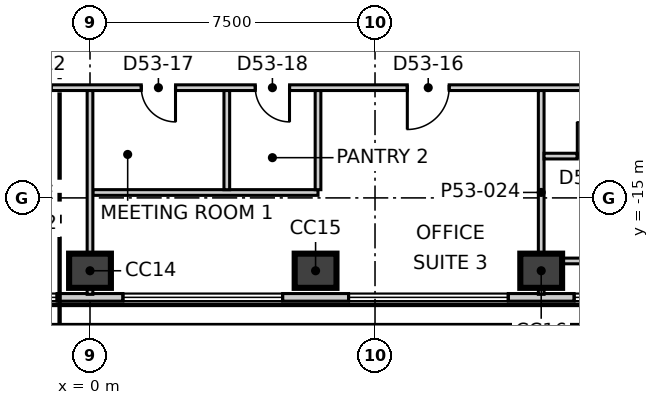
"""IFC4 building model, lengths in metres.
Left out: names, types, materials, properties, quantities, classifications, styles, units other than length and angle.
Written with IfcOpenShell. Run it as: python <this file> out.ifc"""

import sys

from ifc_helpers import new_model, si_unit, direction, frame, frame_2d, origin, origin_2d, place, context, subcontext, project, spatial, rectangle, extrude, element, fill, save


model = new_model("IFC4")
c1 = context("Model", 3, precision=1e-05, world=origin(), true_north=direction((0.0, 1.0)))
c2 = subcontext(c1, "Body", "Model", "MODEL_VIEW")
j1 = project(units=[si_unit("LENGTHUNIT", "METRE"), si_unit("PLANEANGLEUNIT", "RADIAN")], contexts=[c1])
p1 = place(None, origin())
s1 = spatial("IfcSite", under=j1, at=p1, CompositionType="ELEMENT")
p2 = place(p1, origin())
s2 = spatial("IfcBuilding", under=s1, at=p2, CompositionType="ELEMENT")
p3 = place(p2, frame((0.0, 0.0, 227.3)))
s3 = spatial("IfcBuildingStorey", under=s2, at=p3, CompositionType="ELEMENT", Elevation=227.3)
for number, where, z_axis, x_axis in (
    (1, (0.0, -16.917, -0.3), (0.0, 0.0, 1.0), (1.0, 0.0, 0.0)),
    (2, (5.936, -16.917, -0.3), (0.0, 0.0, 1.0), (1.0, 0.0, 0.0)),
    (3, (11.873, -16.917, -0.3), (0.0, 0.0, 1.0), (1.0, 0.0, 0.0)),
):
    element("IfcColumn", number, at=place(p3, frame(where, z_axis=z_axis, x_axis=x_axis)), inside=s3, PredefinedType="COLUMN", context=c2, shape_type="SweptSolid", body=[
        extrude(rectangle(XDim=1.1, YDim=0.9, at=origin_2d()), origin(), (0.0, 0.0, 1.0), 4.0),
    ])
p4 = place(p3, frame((-25.049, -17.617, 0.0), z_axis=(0.0, 0.0, 1.0), x_axis=(1.0, 0.0, 0.0)))
e4 = element("IfcWall", 4, at=p4, inside=s3, PredefinedType="ELEMENTEDWALL", context=c2, shape_type="SweptSolid", body=[
    extrude(rectangle(XDim=50.078, YDim=0.2, at=frame_2d((25.039, 0.0))), origin(), (0.0, 0.0, 1.0), 3.7),
])
p5 = place(p4, frame((2.171, 0.0, 0.9)))
e5 = element("IfcOpeningElement", 5, at=p5, cuts=e4, PredefinedType="OPENING", context=c2, shape_type="SweptSolid", body=[
    extrude(rectangle(XDim=4.2, YDim=2.5, at=frame_2d((2.1, 1.25))), frame((0.0, 0.11, 0.0), z_axis=(0.0, -1.0, 0.0), x_axis=(1.0, 0.0, 0.0)), (0.0, 0.0, 1.0), 0.22),
])
p6 = place(p4, frame((8.108, 0.0, 0.9)))
e6 = element("IfcOpeningElement", 6, at=p6, cuts=e4, PredefinedType="OPENING", context=c2, shape_type="SweptSolid", body=[
    extrude(rectangle(XDim=4.2, YDim=2.5, at=frame_2d((2.1, 1.25))), frame((0.0, 0.11, 0.0), z_axis=(0.0, -1.0, 0.0), x_axis=(1.0, 0.0, 0.0)), (0.0, 0.0, 1.0), 0.22),
])
p7 = place(p4, frame((14.044, 0.0, 0.9)))
e7 = element("IfcOpeningElement", 7, at=p7, cuts=e4, PredefinedType="OPENING", context=c2, shape_type="SweptSolid", body=[
    extrude(rectangle(XDim=4.2, YDim=2.5, at=frame_2d((2.1, 1.25))), frame((0.0, 0.11, 0.0), z_axis=(0.0, -1.0, 0.0), x_axis=(1.0, 0.0, 0.0)), (0.0, 0.0, 1.0), 0.22),
])
p8 = place(p4, frame((19.981, 0.0, 0.9)))
e8 = element("IfcOpeningElement", 8, at=p8, cuts=e4, PredefinedType="OPENING", context=c2, shape_type="SweptSolid", body=[
    extrude(rectangle(XDim=4.2, YDim=2.5, at=frame_2d((2.1, 1.25))), frame((0.0, 0.11, 0.0), z_axis=(0.0, -1.0, 0.0), x_axis=(1.0, 0.0, 0.0)), (0.0, 0.0, 1.0), 0.22),
])
p9 = place(p4, frame((25.917, 0.0, 0.9)))
e9 = element("IfcOpeningElement", 9, at=p9, cuts=e4, PredefinedType="OPENING", context=c2, shape_type="SweptSolid", body=[
    extrude(rectangle(XDim=4.2, YDim=2.5, at=frame_2d((2.1, 1.25))), frame((0.0, 0.11, 0.0), z_axis=(0.0, -1.0, 0.0), x_axis=(1.0, 0.0, 0.0)), (0.0, 0.0, 1.0), 0.22),
])
p10 = place(p4, frame((31.854, 0.0, 0.9)))
e10 = element("IfcOpeningElement", 10, at=p10, cuts=e4, PredefinedType="OPENING", context=c2, shape_type="SweptSolid", body=[
    extrude(rectangle(XDim=4.2, YDim=2.5, at=frame_2d((2.1, 1.25))), frame((0.0, 0.11, 0.0), z_axis=(0.0, -1.0, 0.0), x_axis=(1.0, 0.0, 0.0)), (0.0, 0.0, 1.0), 0.22),
])
p11 = place(p4, frame((37.79, 0.0, 0.9)))
e11 = element("IfcOpeningElement", 11, at=p11, cuts=e4, PredefinedType="OPENING", context=c2, shape_type="SweptSolid", body=[
    extrude(rectangle(XDim=4.2, YDim=2.5, at=frame_2d((2.1, 1.25))), frame((0.0, 0.11, 0.0), z_axis=(0.0, -1.0, 0.0), x_axis=(1.0, 0.0, 0.0)), (0.0, 0.0, 1.0), 0.22),
])
p12 = place(p4, frame((43.727, 0.0, 0.9)))
e12 = element("IfcOpeningElement", 12, at=p12, cuts=e4, PredefinedType="OPENING", context=c2, shape_type="SweptSolid", body=[
    extrude(rectangle(XDim=4.2, YDim=2.5, at=frame_2d((2.1, 1.25))), frame((0.0, 0.11, 0.0), z_axis=(0.0, -1.0, 0.0), x_axis=(1.0, 0.0, 0.0)), (0.0, 0.0, 1.0), 0.22),
])
p13 = place(p3, frame((27.782, -12.884, 0.0), z_axis=(0.0, 0.0, 1.0), x_axis=(-0.500023345841, 0.866011924637, 0.0)))
e13 = element("IfcWall", 13, at=p13, inside=s3, PredefinedType="ELEMENTEDWALL", context=c2, shape_type="SweptSolid", body=[
    extrude(rectangle(XDim=50.078, YDim=0.2, at=frame_2d((25.039, 0.0))), origin(), (0.0, 0.0, 1.0), 3.7),
])
p14 = place(p13, frame((2.171, 0.0, 0.9)))
e14 = element("IfcOpeningElement", 14, at=p14, cuts=e13, PredefinedType="OPENING", context=c2, shape_type="SweptSolid", body=[
    extrude(rectangle(XDim=4.2, YDim=2.5, at=frame_2d((2.1, 1.25))), frame((0.0, 0.11, 0.0), z_axis=(0.0, -1.0, 0.0), x_axis=(1.0, 0.0, 0.0)), (0.0, 0.0, 1.0), 0.22),
])
p15 = place(p13, frame((8.108, 0.0, 0.9)))
e15 = element("IfcOpeningElement", 15, at=p15, cuts=e13, PredefinedType="OPENING", context=c2, shape_type="SweptSolid", body=[
    extrude(rectangle(XDim=4.2, YDim=2.5, at=frame_2d((2.1, 1.25))), frame((0.0, 0.11, 0.0), z_axis=(0.0, -1.0, 0.0), x_axis=(1.0, 0.0, 0.0)), (0.0, 0.0, 1.0), 0.22),
])
p16 = place(p13, frame((14.044, 0.0, 0.9)))
e16 = element("IfcOpeningElement", 16, at=p16, cuts=e13, PredefinedType="OPENING", context=c2, shape_type="SweptSolid", body=[
    extrude(rectangle(XDim=4.2, YDim=2.5, at=frame_2d((2.1, 1.25))), frame((0.0, 0.11, 0.0), z_axis=(0.0, -1.0, 0.0), x_axis=(1.0, 0.0, 0.0)), (0.0, 0.0, 1.0), 0.22),
])
p17 = place(p13, frame((19.981, 0.0, 0.9)))
e17 = element("IfcOpeningElement", 17, at=p17, cuts=e13, PredefinedType="OPENING", context=c2, shape_type="SweptSolid", body=[
    extrude(rectangle(XDim=4.2, YDim=2.5, at=frame_2d((2.1, 1.25))), frame((0.0, 0.11, 0.0), z_axis=(0.0, -1.0, 0.0), x_axis=(1.0, 0.0, 0.0)), (0.0, 0.0, 1.0), 0.22),
])
p18 = place(p13, frame((25.917, 0.0, 0.9)))
e18 = element("IfcOpeningElement", 18, at=p18, cuts=e13, PredefinedType="OPENING", context=c2, shape_type="SweptSolid", body=[
    extrude(rectangle(XDim=4.2, YDim=2.5, at=frame_2d((2.1, 1.25))), frame((0.0, 0.11, 0.0), z_axis=(0.0, -1.0, 0.0), x_axis=(1.0, 0.0, 0.0)), (0.0, 0.0, 1.0), 0.22),
])
p19 = place(p13, frame((31.854, 0.0, 0.9)))
e19 = element("IfcOpeningElement", 19, at=p19, cuts=e13, PredefinedType="OPENING", context=c2, shape_type="SweptSolid", body=[
    extrude(rectangle(XDim=4.2, YDim=2.5, at=frame_2d((2.1, 1.25))), frame((0.0, 0.11, 0.0), z_axis=(0.0, -1.0, 0.0), x_axis=(1.0, 0.0, 0.0)), (0.0, 0.0, 1.0), 0.22),
])
p20 = place(p13, frame((37.79, 0.0, 0.9)))
e20 = element("IfcOpeningElement", 20, at=p20, cuts=e13, PredefinedType="OPENING", context=c2, shape_type="SweptSolid", body=[
    extrude(rectangle(XDim=4.2, YDim=2.5, at=frame_2d((2.1, 1.25))), frame((0.0, 0.11, 0.0), z_axis=(0.0, -1.0, 0.0), x_axis=(1.0, 0.0, 0.0)), (0.0, 0.0, 1.0), 0.22),
])
p21 = place(p13, frame((43.727, 0.0, 0.9)))
e21 = element("IfcOpeningElement", 21, at=p21, cuts=e13, PredefinedType="OPENING", context=c2, shape_type="SweptSolid", body=[
    extrude(rectangle(XDim=4.2, YDim=2.5, at=frame_2d((2.1, 1.25))), frame((0.0, 0.11, 0.0), z_axis=(0.0, -1.0, 0.0), x_axis=(1.0, 0.0, 0.0)), (0.0, 0.0, 1.0), 0.22),
])
p22 = place(p3, frame((-20.882, -11.969, 0.0), z_axis=(0.0, 0.0, 1.0), x_axis=(0.499998738735, 0.866026131975, 0.0)))
e22 = element("IfcWall", 22, at=p22, inside=s3, PredefinedType="PARTITIONING", context=c2, shape_type="SweptSolid", body=[
    extrude(rectangle(XDim=41.764, YDim=0.15, at=frame_2d((20.882, 0.0))), origin(), (0.0, 0.0, 1.0), 3.7),
])
p23 = place(p22, frame((33.714, 0.0, 0.0)))
e23 = element("IfcOpeningElement", 23, at=p23, cuts=e22, PredefinedType="OPENING", context=c2, shape_type="SweptSolid", body=[
    extrude(rectangle(XDim=1.1, YDim=2.1, at=frame_2d((0.55, 1.05))), frame((0.0, 0.085, 0.0), z_axis=(0.0, -1.0, 0.0), x_axis=(1.0, 0.0, 0.0)), (0.0, 0.0, 1.0), 0.17),
])
p24 = place(p22, frame((23.293, 0.0, 0.0)))
e24 = element("IfcOpeningElement", 24, at=p24, cuts=e22, PredefinedType="OPENING", context=c2, shape_type="SweptSolid", body=[
    extrude(rectangle(XDim=1.0, YDim=2.1, at=frame_2d((0.5, 1.05))), frame((0.0, 0.085, 0.0), z_axis=(0.0, -1.0, 0.0), x_axis=(1.0, 0.0, 0.0)), (0.0, 0.0, 1.0), 0.17),
])
p25 = place(p22, frame((13.356, 0.0, 0.0)))
e25 = element("IfcOpeningElement", 25, at=p25, cuts=e22, PredefinedType="OPENING", context=c2, shape_type="SweptSolid", body=[
    extrude(rectangle(XDim=1.1, YDim=2.1, at=frame_2d((0.55, 1.05))), frame((0.0, 0.085, 0.0), z_axis=(0.0, -1.0, 0.0), x_axis=(1.0, 0.0, 0.0)), (0.0, 0.0, 1.0), 0.17),
])
p26 = place(p22, frame((18.556, 0.0, 0.0)))
e26 = element("IfcOpeningElement", 26, at=p26, cuts=e22, PredefinedType="OPENING", context=c2, shape_type="SweptSolid", body=[
    extrude(rectangle(XDim=0.9, YDim=2.1, at=frame_2d((0.45, 1.05))), frame((0.0, 0.085, 0.0), z_axis=(0.0, -1.0, 0.0), x_axis=(1.0, 0.0, 0.0)), (0.0, 0.0, 1.0), 0.17),
])
p27 = place(p22, frame((15.556, 0.0, 0.0)))
e27 = element("IfcOpeningElement", 27, at=p27, cuts=e22, PredefinedType="OPENING", context=c2, shape_type="SweptSolid", body=[
    extrude(rectangle(XDim=0.9, YDim=2.1, at=frame_2d((0.45, 1.05))), frame((0.0, 0.085, 0.0), z_axis=(0.0, -1.0, 0.0), x_axis=(1.0, 0.0, 0.0)), (0.0, 0.0, 1.0), 0.17),
])
p28 = place(p22, frame((3.883, 0.0, 0.0)))
e28 = element("IfcOpeningElement", 28, at=p28, cuts=e22, PredefinedType="OPENING", context=c2, shape_type="SweptSolid", body=[
    extrude(rectangle(XDim=1.1, YDim=2.1, at=frame_2d((0.55, 1.05))), frame((0.0, 0.085, 0.0), z_axis=(0.0, -1.0, 0.0), x_axis=(1.0, 0.0, 0.0)), (0.0, 0.0, 1.0), 0.17),
])
p29 = place(p3, frame((-20.808, -12.1, 0.0), z_axis=(0.0, 0.0, 1.0), x_axis=(1.0, 0.0, 0.0)))
e29 = element("IfcWall", 29, at=p29, inside=s3, PredefinedType="PARTITIONING", context=c2, shape_type="SweptSolid", body=[
    extrude(rectangle(XDim=41.766, YDim=0.15, at=frame_2d((20.883, 0.0))), origin(), (0.0, 0.0, 1.0), 3.7),
])
p30 = place(p29, frame((3.8, 0.0, 0.0)))
e30 = element("IfcOpeningElement", 30, at=p30, cuts=e29, PredefinedType="OPENING", context=c2, shape_type="SweptSolid", body=[
    extrude(rectangle(XDim=1.1, YDim=2.1, at=frame_2d((0.55, 1.05))), frame((0.0, 0.085, 0.0), z_axis=(0.0, -1.0, 0.0), x_axis=(1.0, 0.0, 0.0)), (0.0, 0.0, 1.0), 0.17),
])
p31 = place(p29, frame((18.685, 0.0, 0.0)))
e31 = element("IfcOpeningElement", 31, at=p31, cuts=e29, PredefinedType="OPENING", context=c2, shape_type="SweptSolid", body=[
    extrude(rectangle(XDim=1.1, YDim=2.1, at=frame_2d((0.55, 1.05))), frame((0.0, 0.085, 0.0), z_axis=(0.0, -1.0, 0.0), x_axis=(1.0, 0.0, 0.0)), (0.0, 0.0, 1.0), 0.17),
])
p32 = place(p29, frame((10.085, 0.0, 0.0)))
e32 = element("IfcOpeningElement", 32, at=p32, cuts=e29, PredefinedType="OPENING", context=c2, shape_type="SweptSolid", body=[
    extrude(rectangle(XDim=0.9, YDim=2.1, at=frame_2d((0.45, 1.05))), frame((0.0, 0.085, 0.0), z_axis=(0.0, -1.0, 0.0), x_axis=(1.0, 0.0, 0.0)), (0.0, 0.0, 1.0), 0.17),
])
p33 = place(p29, frame((13.285, 0.0, 0.0)))
e33 = element("IfcOpeningElement", 33, at=p33, cuts=e29, PredefinedType="OPENING", context=c2, shape_type="SweptSolid", body=[
    extrude(rectangle(XDim=0.9, YDim=2.1, at=frame_2d((0.45, 1.05))), frame((0.0, 0.085, 0.0), z_axis=(0.0, -1.0, 0.0), x_axis=(1.0, 0.0, 0.0)), (0.0, 0.0, 1.0), 0.17),
])
p34 = place(p29, frame((15.985, 0.0, 0.0)))
e34 = element("IfcOpeningElement", 34, at=p34, cuts=e29, PredefinedType="OPENING", context=c2, shape_type="SweptSolid", body=[
    extrude(rectangle(XDim=1.0, YDim=2.1, at=frame_2d((0.5, 1.05))), frame((0.0, 0.085, 0.0), z_axis=(0.0, -1.0, 0.0), x_axis=(1.0, 0.0, 0.0)), (0.0, 0.0, 1.0), 0.17),
])
p35 = place(p29, frame((29.158, 0.0, 0.0)))
e35 = element("IfcOpeningElement", 35, at=p35, cuts=e29, PredefinedType="OPENING", context=c2, shape_type="SweptSolid", body=[
    extrude(rectangle(XDim=1.1, YDim=2.1, at=frame_2d((0.55, 1.05))), frame((0.0, 0.085, 0.0), z_axis=(0.0, -1.0, 0.0), x_axis=(1.0, 0.0, 0.0)), (0.0, 0.0, 1.0), 0.17),
])
p36 = place(p29, frame((22.158, 0.0, 0.0)))
e36 = element("IfcOpeningElement", 36, at=p36, cuts=e29, PredefinedType="OPENING", context=c2, shape_type="SweptSolid", body=[
    extrude(rectangle(XDim=0.9, YDim=2.1, at=frame_2d((0.45, 1.05))), frame((0.0, 0.085, 0.0), z_axis=(0.0, -1.0, 0.0), x_axis=(1.0, 0.0, 0.0)), (0.0, 0.0, 1.0), 0.17),
])
p37 = place(p29, frame((25.158, 0.0, 0.0)))
e37 = element("IfcOpeningElement", 37, at=p37, cuts=e29, PredefinedType="OPENING", context=c2, shape_type="SweptSolid", body=[
    extrude(rectangle(XDim=0.9, YDim=2.1, at=frame_2d((0.45, 1.05))), frame((0.0, 0.085, 0.0), z_axis=(0.0, -1.0, 0.0), x_axis=(1.0, 0.0, 0.0)), (0.0, 0.0, 1.0), 0.17),
])
p38 = place(p29, frame((36.731, 0.0, 0.0)))
e38 = element("IfcOpeningElement", 38, at=p38, cuts=e29, PredefinedType="OPENING", context=c2, shape_type="SweptSolid", body=[
    extrude(rectangle(XDim=1.0, YDim=2.1, at=frame_2d((0.5, 1.05))), frame((0.0, 0.085, 0.0), z_axis=(0.0, -1.0, 0.0), x_axis=(1.0, 0.0, 0.0)), (0.0, 0.0, 1.0), 0.17),
])
p39 = place(p3, frame((0.075, -14.858, 0.0), z_axis=(0.0, 0.0, 1.0), x_axis=(1.0, 0.0, 0.0)))
e39 = element("IfcWall", 39, at=p39, inside=s3, PredefinedType="PARTITIONING", context=c2, shape_type="SweptSolid", body=[
    extrude(rectangle(XDim=5.925, YDim=0.15, at=frame_2d((2.962, 0.0))), origin(), (0.0, 0.0, 1.0), 3.7),
])
p40 = place(p3, frame((0.0, -17.537, 0.0), z_axis=(0.0, 0.0, 1.0), x_axis=(0.0, 1.0, 0.0)))
e40 = element("IfcWall", 40, at=p40, inside=s3, PredefinedType="PARTITIONING", context=c2, shape_type="SweptSolid", body=[
    extrude(rectangle(XDim=5.362, YDim=0.15, at=frame_2d((2.681, 0.0))), origin(), (0.0, 0.0, 1.0), 3.2),
])
p41 = place(p3, frame((0.075, 24.07, 0.0), z_axis=(0.0, 0.0, 1.0), x_axis=(0.49999939571, -0.866025752671, 0.0)))
e41 = element("IfcWall", 41, at=p41, inside=s3, PredefinedType="PARTITIONING", context=c2, shape_type="SweptSolid", body=[
    extrude(rectangle(XDim=41.614, YDim=0.15, at=frame_2d((20.807, 0.0))), origin(), (0.0, 0.0, 1.0), 3.7),
])
p42 = place(p41, frame((36.714, 0.0, 0.0)))
e42 = element("IfcOpeningElement", 42, at=p42, cuts=e41, PredefinedType="OPENING", context=c2, shape_type="SweptSolid", body=[
    extrude(rectangle(XDim=1.1, YDim=2.1, at=frame_2d((0.55, 1.05))), frame((0.0, 0.085, 0.0), z_axis=(0.0, -1.0, 0.0), x_axis=(1.0, 0.0, 0.0)), (0.0, 0.0, 1.0), 0.17),
])
p43 = place(p41, frame((21.831, 0.0, 0.0)))
e43 = element("IfcOpeningElement", 43, at=p43, cuts=e41, PredefinedType="OPENING", context=c2, shape_type="SweptSolid", body=[
    extrude(rectangle(XDim=1.1, YDim=2.1, at=frame_2d((0.55, 1.05))), frame((0.0, 0.085, 0.0), z_axis=(0.0, -1.0, 0.0), x_axis=(1.0, 0.0, 0.0)), (0.0, 0.0, 1.0), 0.17),
])
p44 = place(p41, frame((30.631, 0.0, 0.0)))
e44 = element("IfcOpeningElement", 44, at=p44, cuts=e41, PredefinedType="OPENING", context=c2, shape_type="SweptSolid", body=[
    extrude(rectangle(XDim=0.9, YDim=2.1, at=frame_2d((0.45, 1.05))), frame((0.0, 0.085, 0.0), z_axis=(0.0, -1.0, 0.0), x_axis=(1.0, 0.0, 0.0)), (0.0, 0.0, 1.0), 0.17),
])
p45 = place(p41, frame((27.431, 0.0, 0.0)))
e45 = element("IfcOpeningElement", 45, at=p45, cuts=e41, PredefinedType="OPENING", context=c2, shape_type="SweptSolid", body=[
    extrude(rectangle(XDim=0.9, YDim=2.1, at=frame_2d((0.45, 1.05))), frame((0.0, 0.085, 0.0), z_axis=(0.0, -1.0, 0.0), x_axis=(1.0, 0.0, 0.0)), (0.0, 0.0, 1.0), 0.17),
])
p46 = place(p41, frame((24.631, 0.0, 0.0)))
e46 = element("IfcOpeningElement", 46, at=p46, cuts=e41, PredefinedType="OPENING", context=c2, shape_type="SweptSolid", body=[
    extrude(rectangle(XDim=1.0, YDim=2.1, at=frame_2d((0.5, 1.05))), frame((0.0, 0.085, 0.0), z_axis=(0.0, -1.0, 0.0), x_axis=(1.0, 0.0, 0.0)), (0.0, 0.0, 1.0), 0.17),
])
p47 = place(p41, frame((14.358, 0.0, 0.0)))
e47 = element("IfcOpeningElement", 47, at=p47, cuts=e41, PredefinedType="OPENING", context=c2, shape_type="SweptSolid", body=[
    extrude(rectangle(XDim=1.1, YDim=2.1, at=frame_2d((0.55, 1.05))), frame((0.0, 0.085, 0.0), z_axis=(0.0, -1.0, 0.0), x_axis=(1.0, 0.0, 0.0)), (0.0, 0.0, 1.0), 0.17),
])
p48 = place(p41, frame((3.885, 0.0, 0.0)))
e48 = element("IfcOpeningElement", 48, at=p48, cuts=e41, PredefinedType="OPENING", context=c2, shape_type="SweptSolid", body=[
    extrude(rectangle(XDim=1.1, YDim=2.1, at=frame_2d((0.55, 1.05))), frame((0.0, 0.085, 0.0), z_axis=(0.0, -1.0, 0.0), x_axis=(1.0, 0.0, 0.0)), (0.0, 0.0, 1.0), 0.17),
])
for number, where, z_axis, x_axis in (
    (49, (6.0, -14.784, 0.0), (0.0, 0.0, 1.0), (0.0, 1.0, 0.0)),
    (50, (3.6, -14.784, 0.0), (0.0, 0.0, 1.0), (0.0, 1.0, 0.0)),
):
    element("IfcWall", number, at=place(p3, frame(where, z_axis=z_axis, x_axis=x_axis)), inside=s3, PredefinedType="PARTITIONING", context=c2, shape_type="SweptSolid", body=[
        extrude(rectangle(XDim=2.609, YDim=0.15, at=frame_2d((1.304, 0.0))), origin(), (0.0, 0.0, 1.0), 3.7),
    ])
p49 = place(p3, frame((11.873, -17.537, 0.0), z_axis=(0.0, 0.0, 1.0), x_axis=(0.0, 1.0, 0.0)))
e51 = element("IfcWall", 51, at=p49, inside=s3, PredefinedType="PARTITIONING", context=c2, shape_type="SweptSolid", body=[
    extrude(rectangle(XDim=5.362, YDim=0.15, at=frame_2d((2.681, 0.0))), origin(), (0.0, 0.0, 1.0), 3.7),
])
p50 = place(p3, frame((11.948, -16.659, 0.0), z_axis=(0.0, 0.0, 1.0), x_axis=(1.0, 0.0, 0.0)))
e52 = element("IfcWall", 52, at=p50, inside=s3, PredefinedType="PARTITIONING", context=c2, shape_type="SweptSolid", body=[
    extrude(rectangle(XDim=2.725, YDim=0.15, at=frame_2d((1.363, 0.0))), origin(), (0.0, 0.0, 1.0), 2.95),
])
p51 = place(p3, frame((11.948, -13.9, 0.0), z_axis=(0.0, 0.0, 1.0), x_axis=(1.0, 0.0, 0.0)))
e53 = element("IfcWall", 53, at=p51, inside=s3, PredefinedType="PARTITIONING", context=c2, shape_type="SweptSolid", body=[
    extrude(rectangle(XDim=2.65, YDim=0.15, at=frame_2d((1.325, 0.0))), origin(), (0.0, 0.0, 1.0), 3.7),
])
p52 = place(p51, frame((0.875, 0.0, 0.0)))
e54 = element("IfcOpeningElement", 54, at=p52, cuts=e53, PredefinedType="OPENING", context=c2, shape_type="SweptSolid", body=[
    extrude(rectangle(XDim=0.9, YDim=2.1, at=frame_2d((0.45, 1.05))), frame((0.0, 0.085, 0.0), z_axis=(0.0, -1.0, 0.0), x_axis=(1.0, 0.0, 0.0)), (0.0, 0.0, 1.0), 0.17),
])
p53 = place(p8, origin())
e55 = element("IfcWindow", 55, at=p53, inside=s3, PartitioningType="SINGLE_PANEL", PredefinedType="WINDOW", context=c2, shape_type="SweptSolid", body=[
    extrude(rectangle(XDim=4.2, YDim=2.5, at=frame_2d((2.1, 1.25))), frame((0.0, 0.03, 0.0), z_axis=(0.0, -1.0, 0.0), x_axis=(1.0, 0.0, 0.0)), (0.0, 0.0, 1.0), 0.06),
])
fill(e8, e55)
p54 = place(p9, origin())
e56 = element("IfcWindow", 56, at=p54, inside=s3, PartitioningType="SINGLE_PANEL", PredefinedType="WINDOW", context=c2, shape_type="SweptSolid", body=[
    extrude(rectangle(XDim=4.2, YDim=2.5, at=frame_2d((2.1, 1.25))), frame((0.0, 0.03, 0.0), z_axis=(0.0, -1.0, 0.0), x_axis=(1.0, 0.0, 0.0)), (0.0, 0.0, 1.0), 0.06),
])
fill(e9, e56)
p55 = place(p10, origin())
e57 = element("IfcWindow", 57, at=p55, inside=s3, PartitioningType="SINGLE_PANEL", PredefinedType="WINDOW", context=c2, shape_type="SweptSolid", body=[
    extrude(rectangle(XDim=4.2, YDim=2.5, at=frame_2d((2.1, 1.25))), frame((0.0, 0.03, 0.0), z_axis=(0.0, -1.0, 0.0), x_axis=(1.0, 0.0, 0.0)), (0.0, 0.0, 1.0), 0.06),
])
fill(e10, e57)
p56 = place(p11, origin())
e58 = element("IfcWindow", 58, at=p56, inside=s3, PartitioningType="SINGLE_PANEL", PredefinedType="WINDOW", context=c2, shape_type="SweptSolid", body=[
    extrude(rectangle(XDim=4.2, YDim=2.5, at=frame_2d((2.1, 1.25))), frame((0.0, 0.03, 0.0), z_axis=(0.0, -1.0, 0.0), x_axis=(1.0, 0.0, 0.0)), (0.0, 0.0, 1.0), 0.06),
])
fill(e11, e58)
p57 = place(p35, origin())
e59 = element("IfcDoor", 59, at=p57, inside=s3, OperationType="SINGLE_SWING_LEFT", PredefinedType="DOOR", context=c2, shape_type="SweptSolid", body=[
    extrude(rectangle(XDim=1.1, YDim=2.1, at=frame_2d((0.55, 1.05))), frame((0.0, 0.025, 0.0), z_axis=(0.0, -1.0, 0.0), x_axis=(1.0, 0.0, 0.0)), (0.0, 0.0, 1.0), 0.05),
])
fill(e35, e59)
p58 = place(p36, origin())
e60 = element("IfcDoor", 60, at=p58, inside=s3, OperationType="SINGLE_SWING_RIGHT", PredefinedType="DOOR", context=c2, shape_type="SweptSolid", body=[
    extrude(rectangle(XDim=0.9, YDim=2.1, at=frame_2d((0.45, 1.05))), frame((0.0, 0.025, 0.0), z_axis=(0.0, -1.0, 0.0), x_axis=(1.0, 0.0, 0.0)), (0.0, 0.0, 1.0), 0.05),
])
fill(e36, e60)
p59 = place(p37, origin())
e61 = element("IfcDoor", 61, at=p59, inside=s3, OperationType="SINGLE_SWING_RIGHT", PredefinedType="DOOR", context=c2, shape_type="SweptSolid", body=[
    extrude(rectangle(XDim=0.9, YDim=2.1, at=frame_2d((0.45, 1.05))), frame((0.0, 0.025, 0.0), z_axis=(0.0, -1.0, 0.0), x_axis=(1.0, 0.0, 0.0)), (0.0, 0.0, 1.0), 0.05),
])
fill(e37, e61)
p60 = place(p52, origin())
e62 = element("IfcDoor", 62, at=p60, inside=s3, OperationType="SINGLE_SWING_RIGHT", PredefinedType="DOOR", context=c2, shape_type="SweptSolid", body=[
    extrude(rectangle(XDim=0.9, YDim=2.1, at=frame_2d((0.45, 1.05))), frame((0.0, 0.025, 0.0), z_axis=(0.0, -1.0, 0.0), x_axis=(1.0, 0.0, 0.0)), (0.0, 0.0, 1.0), 0.05),
])
fill(e54, e62)
save(model, sys.argv[1])
